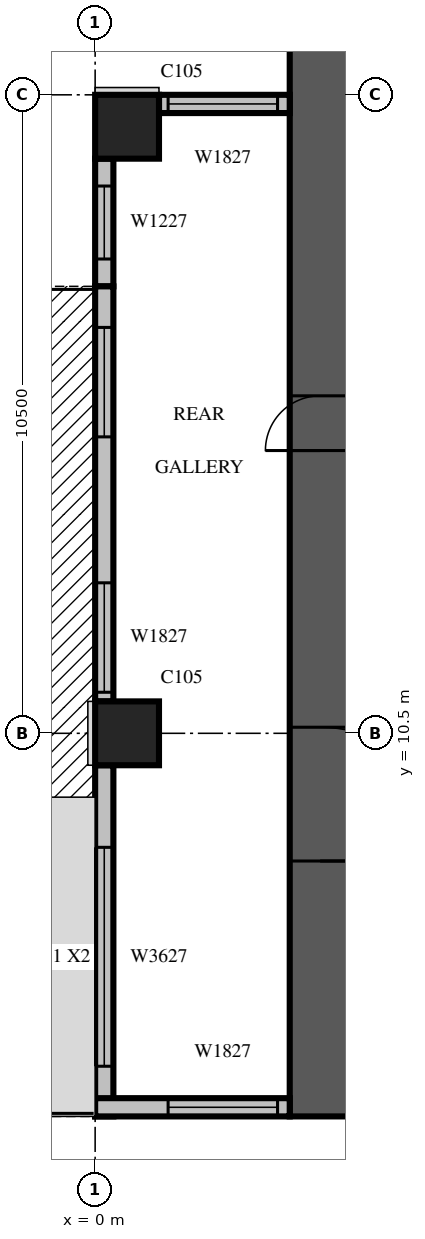
"""IFC4 building model, lengths in metres.
Left out: names, types, materials, properties, quantities, classifications, styles, units other than length and angle.
Written with IfcOpenShell. Run it as: python <this file> out.ifc"""

import sys

from ifc_helpers import new_model, si_unit, direction, frame, frame_2d, origin, origin_2d, place, context, subcontext, project, spatial, rectangle, extrude, source, transform, mapped, element, fill, save


model = new_model("IFC4")
c1 = context("Model", 3, precision=1e-05, world=origin(), true_north=direction((0.0, 1.0)))
c2 = subcontext(c1, "Body", "Model", "MODEL_VIEW")
j1 = project(units=[si_unit("LENGTHUNIT", "METRE"), si_unit("PLANEANGLEUNIT", "RADIAN")], contexts=[c1])
p1 = place(None, origin())
s1 = spatial("IfcSite", under=j1, at=p1, CompositionType="ELEMENT")
p2 = place(p1, origin())
s2 = spatial("IfcBuilding", under=s1, at=p2, CompositionType="ELEMENT")
p3 = place(p2, frame((0.0, 0.0, 132.9)))
s3 = spatial("IfcBuildingStorey", under=s2, at=p3, CompositionType="ELEMENT", Elevation=132.9)
m1 = source(origin(), c2, "Body", "SweptSolid", [
    extrude(rectangle(XDim=1.05, YDim=1.05, at=origin_2d()), origin(), (0.0, 0.0, 1.0), 4.2),
])
for number, where, z_axis, x_axis in (
    (1, (0.525, 10.5, 0.0), (0.0, 0.0, 1.0), (1.0, 0.0, 0.0)),
    (2, (0.525, 20.475, 0.0), (0.0, 0.0, 1.0), (1.0, 0.0, 0.0)),
):
    element("IfcColumn", number, at=place(p3, frame(where, z_axis=z_axis, x_axis=x_axis)), inside=s3, PredefinedType="COLUMN", context=c2, shape_type="MappedRepresentation", body=[
        mapped(m1, transform((0.0, 0.0, 0.0), scale=1.0)),
    ])
m2 = source(origin(), c2, "Body", "SweptSolid", [
    extrude(rectangle(XDim=17.8, YDim=1.0, at=frame_2d((8.9, 0.0))), origin(), (0.0, 0.0, 1.0), 4.2),
])
p4 = place(p3, frame((3.7, 4.2, 0.0), z_axis=(0.0, 0.0, 1.0), x_axis=(0.0, 1.0, 0.0)))
e3 = element("IfcWall", 3, at=p4, inside=s3, PredefinedType="SHEAR", context=c2, shape_type="MappedRepresentation", body=[
    mapped(m2, transform((0.0, 0.0, 0.0), scale=1.0)),
])
m3 = source(origin(), c2, "Body", "SweptSolid", [
    extrude(rectangle(XDim=2.2, YDim=2.1, at=frame_2d((1.1, 1.05))), frame((0.0, 0.51, 0.0), z_axis=(0.0, -1.0, 0.0), x_axis=(1.0, 0.0, 0.0)), (0.0, 0.0, 1.0), 1.02),
])
p5 = place(p4, frame((4.2, 0.0, 0.0)))
e4 = element("IfcOpeningElement", 4, at=p5, cuts=e3, PredefinedType="OPENING", context=c2, shape_type="MappedRepresentation", body=[
    mapped(m3, transform((0.0, 0.0, 0.0), scale=1.0)),
])
m4 = source(origin(), c2, "Body", "SweptSolid", [
    extrude(rectangle(XDim=0.9, YDim=2.1, at=frame_2d((0.45, 1.05))), frame((0.0, 0.51, 0.0), z_axis=(0.0, -1.0, 0.0), x_axis=(1.0, 0.0, 0.0)), (0.0, 0.0, 1.0), 1.02),
])
p6 = place(p4, frame((10.95, 0.0, 0.0)))
e5 = element("IfcOpeningElement", 5, at=p6, cuts=e3, PredefinedType="OPENING", context=c2, shape_type="MappedRepresentation", body=[
    mapped(m4, transform((0.0, 0.0, 0.0), scale=1.0)),
])
m5 = source(origin(), c2, "Body", "SweptSolid", [
    extrude(rectangle(XDim=2.15, YDim=0.3, at=frame_2d((1.075, 0.0))), origin(), (0.0, 0.0, 1.0), 3.8),
])
p7 = place(p3, frame((3.2, 20.85, 0.0), z_axis=(0.0, 0.0, 1.0), x_axis=(-1.0, 0.0, 0.0)))
e6 = element("IfcWall", 6, at=p7, inside=s3, PredefinedType="STANDARD", context=c2, shape_type="MappedRepresentation", body=[
    mapped(m5, transform((0.0, 0.0, 0.0), scale=1.0)),
])
m6 = source(origin(), c2, "Body", "SweptSolid", [
    extrude(rectangle(XDim=1.8, YDim=2.7, at=frame_2d((0.9, 1.35))), frame((0.0, 0.16, 0.0), z_axis=(0.0, -1.0, 0.0), x_axis=(1.0, 0.0, 0.0)), (0.0, 0.0, 1.0), 0.32),
])
p8 = place(p7, frame((0.2, 0.0, 0.6)))
e7 = element("IfcOpeningElement", 7, at=p8, cuts=e6, PredefinedType="OPENING", context=c2, shape_type="MappedRepresentation", body=[
    mapped(m6, transform((0.0, 0.0, 0.0), scale=1.0)),
])
m7 = source(origin(), c2, "Body", "SweptSolid", [
    extrude(rectangle(XDim=2.1, YDim=0.3, at=frame_2d((1.05, 0.0))), origin(), (0.0, 0.0, 1.0), 3.8),
])
p9 = place(p3, frame((0.15, 19.95, 0.0), z_axis=(0.0, 0.0, 1.0), x_axis=(0.0, -1.0, 0.0)))
e8 = element("IfcWall", 8, at=p9, inside=s3, PredefinedType="STANDARD", context=c2, shape_type="MappedRepresentation", body=[
    mapped(m7, transform((0.0, 0.0, 0.0), scale=1.0)),
])
m8 = source(origin(), c2, "Body", "SweptSolid", [
    extrude(rectangle(XDim=1.2, YDim=2.7, at=frame_2d((0.6, 1.35))), frame((0.0, 0.16, 0.0), z_axis=(0.0, -1.0, 0.0), x_axis=(1.0, 0.0, 0.0)), (0.0, 0.0, 1.0), 0.32),
])
p10 = place(p9, frame((0.45, 0.0, 0.6)))
e9 = element("IfcOpeningElement", 9, at=p10, cuts=e8, PredefinedType="OPENING", context=c2, shape_type="MappedRepresentation", body=[
    mapped(m8, transform((0.0, 0.0, 0.0), scale=1.0)),
])
m9 = source(origin(), c2, "Body", "SweptSolid", [
    extrude(rectangle(XDim=6.825, YDim=0.3, at=frame_2d((3.413, 0.0))), origin(), (0.0, 0.0, 1.0), 3.8),
])
p11 = place(p3, frame((0.15, 17.85, 0.0), z_axis=(0.0, 0.0, 1.0), x_axis=(0.0, -1.0, 0.0)))
e10 = element("IfcWall", 10, at=p11, inside=s3, PredefinedType="STANDARD", context=c2, shape_type="MappedRepresentation", body=[
    mapped(m9, transform((0.0, 0.0, 0.0), scale=1.0)),
])
m10 = source(origin(), c2, "Body", "SweptSolid", [
    extrude(rectangle(XDim=1.8, YDim=2.4, at=frame_2d((0.9, 1.2))), frame((0.0, 0.16, 0.0), z_axis=(0.0, -1.0, 0.0), x_axis=(1.0, 0.0, 0.0)), (0.0, 0.0, 1.0), 0.32),
])
p12 = place(p11, frame((0.675, 0.0, 0.0)))
e11 = element("IfcOpeningElement", 11, at=p12, cuts=e10, PredefinedType="OPENING", context=c2, shape_type="MappedRepresentation", body=[
    mapped(m10, transform((0.0, 0.0, 0.0), scale=1.0)),
])
p13 = place(p11, frame((4.875, 0.0, 0.6)))
e12 = element("IfcOpeningElement", 12, at=p13, cuts=e10, PredefinedType="OPENING", context=c2, shape_type="MappedRepresentation", body=[
    mapped(m6, transform((0.0, 0.0, 0.0), scale=1.0)),
])
m11 = source(origin(), c2, "Body", "SweptSolid", [
    extrude(rectangle(XDim=5.775, YDim=0.3, at=frame_2d((2.888, 0.0))), origin(), (0.0, 0.0, 1.0), 3.8),
])
p14 = place(p3, frame((0.15, 9.975, 0.0), z_axis=(0.0, 0.0, 1.0), x_axis=(0.0, -1.0, 0.0)))
e13 = element("IfcWall", 13, at=p14, inside=s3, PredefinedType="STANDARD", context=c2, shape_type="MappedRepresentation", body=[
    mapped(m11, transform((0.0, 0.0, 0.0), scale=1.0)),
])
m12 = source(origin(), c2, "Body", "SweptSolid", [
    extrude(rectangle(XDim=3.6, YDim=2.7, at=frame_2d((1.8, 1.35))), frame((0.0, 0.16, 0.0), z_axis=(0.0, -1.0, 0.0), x_axis=(1.0, 0.0, 0.0)), (0.0, 0.0, 1.0), 0.32),
])
p15 = place(p14, frame((1.35, 0.0, 0.6)))
e14 = element("IfcOpeningElement", 14, at=p15, cuts=e13, PredefinedType="OPENING", context=c2, shape_type="MappedRepresentation", body=[
    mapped(m12, transform((0.0, 0.0, 0.0), scale=1.0)),
])
m13 = source(origin(), c2, "Body", "SweptSolid", [
    extrude(rectangle(XDim=3.2, YDim=0.3, at=frame_2d((1.6, 0.0))), origin(), (0.0, 0.0, 1.0), 3.8),
])
p16 = place(p3, frame((0.0, 4.35, 0.0), z_axis=(0.0, 0.0, 1.0), x_axis=(1.0, 0.0, 0.0)))
e15 = element("IfcWall", 15, at=p16, inside=s3, PredefinedType="STANDARD", context=c2, shape_type="MappedRepresentation", body=[
    mapped(m13, transform((0.0, 0.0, 0.0), scale=1.0)),
])
p17 = place(p16, frame((1.2, 0.0, 0.6)))
e16 = element("IfcOpeningElement", 16, at=p17, cuts=e15, PredefinedType="OPENING", context=c2, shape_type="MappedRepresentation", body=[
    mapped(m6, transform((0.0, 0.0, 0.0), scale=1.0)),
])
m14 = source(origin(), c2, "Body", "SweptSolid", [
    extrude(rectangle(XDim=1.8, YDim=2.7, at=frame_2d((0.9, 1.35))), frame((0.0, 0.03, 0.0), z_axis=(0.0, -1.0, 0.0), x_axis=(1.0, 0.0, 0.0)), (0.0, 0.0, 1.0), 0.06),
])
p18 = place(p8, origin())
e17 = element("IfcWindow", 17, at=p18, inside=s3, PartitioningType="SINGLE_PANEL", PredefinedType="WINDOW", context=c2, shape_type="MappedRepresentation", body=[
    mapped(m14, transform((0.0, 0.0, 0.0), scale=1.0)),
])
fill(e7, e17)
m15 = source(origin(), c2, "Body", "SweptSolid", [
    extrude(rectangle(XDim=1.2, YDim=2.7, at=frame_2d((0.6, 1.35))), frame((0.0, 0.03, 0.0), z_axis=(0.0, -1.0, 0.0), x_axis=(1.0, 0.0, 0.0)), (0.0, 0.0, 1.0), 0.06),
])
p19 = place(p10, origin())
e18 = element("IfcWindow", 18, at=p19, inside=s3, PartitioningType="SINGLE_PANEL", PredefinedType="WINDOW", context=c2, shape_type="MappedRepresentation", body=[
    mapped(m15, transform((0.0, 0.0, 0.0), scale=1.0)),
])
fill(e9, e18)
m16 = source(origin(), c2, "Body", "SweptSolid", [
    extrude(rectangle(XDim=1.8, YDim=2.4, at=frame_2d((0.9, 1.2))), frame((0.0, 0.025, 0.0), z_axis=(0.0, -1.0, 0.0), x_axis=(1.0, 0.0, 0.0)), (0.0, 0.0, 1.0), 0.05),
])
p20 = place(p12, origin())
e19 = element("IfcDoor", 19, at=p20, inside=s3, OperationType="SLIDING_TO_LEFT", PredefinedType="DOOR", context=c2, shape_type="MappedRepresentation", body=[
    mapped(m16, transform((0.0, 0.0, 0.0), scale=1.0)),
])
fill(e11, e19)
p21 = place(p13, origin())
e20 = element("IfcWindow", 20, at=p21, inside=s3, PartitioningType="SINGLE_PANEL", PredefinedType="WINDOW", context=c2, shape_type="MappedRepresentation", body=[
    mapped(m14, transform((0.0, 0.0, 0.0), scale=1.0)),
])
fill(e12, e20)
m17 = source(origin(), c2, "Body", "SweptSolid", [
    extrude(rectangle(XDim=3.6, YDim=2.7, at=frame_2d((1.8, 1.35))), frame((0.0, 0.03, 0.0), z_axis=(0.0, -1.0, 0.0), x_axis=(1.0, 0.0, 0.0)), (0.0, 0.0, 1.0), 0.06),
])
p22 = place(p15, origin())
e21 = element("IfcWindow", 21, at=p22, inside=s3, PartitioningType="SINGLE_PANEL", PredefinedType="WINDOW", context=c2, shape_type="MappedRepresentation", body=[
    mapped(m17, transform((0.0, 0.0, 0.0), scale=1.0)),
])
fill(e14, e21)
p23 = place(p17, origin())
e22 = element("IfcWindow", 22, at=p23, inside=s3, PartitioningType="SINGLE_PANEL", PredefinedType="WINDOW", context=c2, shape_type="MappedRepresentation", body=[
    mapped(m14, transform((0.0, 0.0, 0.0), scale=1.0)),
])
fill(e16, e22)
m18 = source(origin(), c2, "Body", "SweptSolid", [
    extrude(rectangle(XDim=2.2, YDim=2.1, at=frame_2d((1.1, 1.05))), frame((0.0, 0.025, 0.0), z_axis=(0.0, -1.0, 0.0), x_axis=(1.0, 0.0, 0.0)), (0.0, 0.0, 1.0), 0.05),
])
p24 = place(p5, origin())
e23 = element("IfcDoor", 23, at=p24, inside=s3, OperationType="DOUBLE_DOOR_SINGLE_SWING", PredefinedType="DOOR", context=c2, shape_type="MappedRepresentation", body=[
    mapped(m18, transform((0.0, 0.0, 0.0), scale=1.0)),
])
fill(e4, e23)
m19 = source(origin(), c2, "Body", "SweptSolid", [
    extrude(rectangle(XDim=0.9, YDim=2.1, at=frame_2d((0.45, 1.05))), frame((0.0, 0.025, 0.0), z_axis=(0.0, -1.0, 0.0), x_axis=(1.0, 0.0, 0.0)), (0.0, 0.0, 1.0), 0.05),
])
p25 = place(p6, origin())
e24 = element("IfcDoor", 24, at=p25, inside=s3, OperationType="SINGLE_SWING_LEFT", PredefinedType="DOOR", context=c2, shape_type="MappedRepresentation", body=[
    mapped(m19, transform((0.0, 0.0, 0.0), scale=1.0)),
])
fill(e5, e24)
save(model, sys.argv[1])
